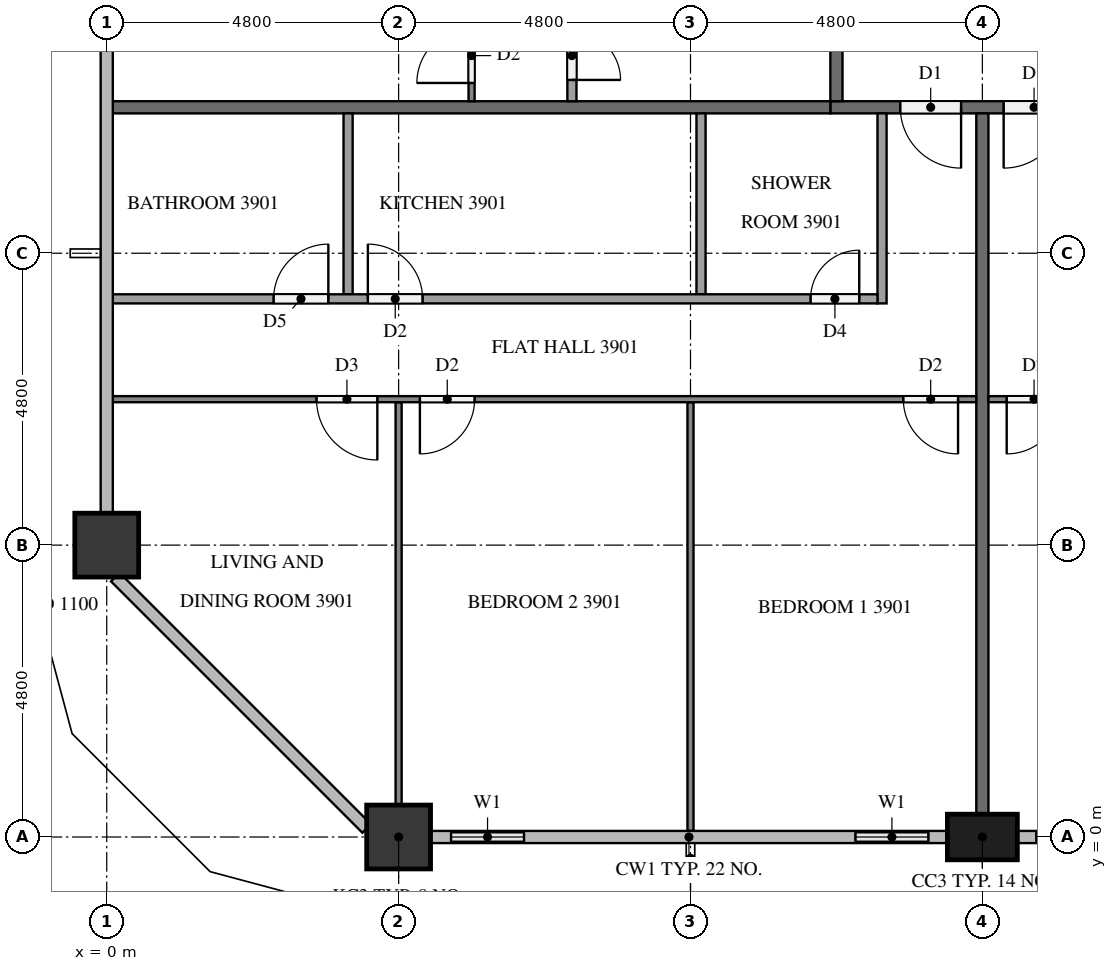
"""IFC4 building model, lengths in metres.
Left out: names, types, materials, properties, quantities, classifications, styles, units other than length and angle.
Written with IfcOpenShell. Run it as: python <this file> out.ifc"""

import sys

from ifc_helpers import new_model, si_unit, direction, frame, frame_2d, origin, origin_2d, place, context, subcontext, project, spatial, rectangle, extrude, element, fill, save


model = new_model("IFC4")
c1 = context("Model", 3, precision=1e-05, world=origin(), true_north=direction((0.0, 1.0)))
c2 = subcontext(c1, "Body", "Model", "MODEL_VIEW")
j1 = project(units=[si_unit("LENGTHUNIT", "METRE"), si_unit("PLANEANGLEUNIT", "RADIAN")], contexts=[c1])
p1 = place(None, origin())
s1 = spatial("IfcSite", under=j1, at=p1, CompositionType="ELEMENT")
p2 = place(p1, origin())
s2 = spatial("IfcBuilding", under=s1, at=p2, CompositionType="ELEMENT")
p3 = place(p2, frame((0.0, 0.0, 152.5)))
s3 = spatial("IfcBuildingStorey", under=s2, at=p3, CompositionType="ELEMENT", Elevation=152.5)
p4 = place(p3, frame((4.8, 0.0, 0.0), z_axis=(0.0, 0.0, 1.0), x_axis=(1.0, 0.0, 0.0)))
e1 = element("IfcColumn", 1, at=p4, inside=s3, PredefinedType="COLUMN", context=c2, shape_type="SweptSolid", body=[
    extrude(rectangle(XDim=1.05, YDim=1.05, at=origin_2d()), origin(), (0.0, 0.0, 1.0), 3.2),
])
p5 = place(p3, frame((14.4, 0.0, 0.0), z_axis=(0.0, 0.0, 1.0), x_axis=(1.0, 0.0, 0.0)))
e2 = element("IfcColumn", 2, at=p5, inside=s3, PredefinedType="COLUMN", context=c2, shape_type="SweptSolid", body=[
    extrude(rectangle(XDim=1.15, YDim=0.75, at=origin_2d()), origin(), (0.0, 0.0, 1.0), 3.2),
])
p6 = place(p3, frame((0.0, 4.8, 0.0), z_axis=(0.0, 0.0, 1.0), x_axis=(1.0, 0.0, 0.0)))
e3 = element("IfcColumn", 3, at=p6, inside=s3, PredefinedType="COLUMN", context=c2, shape_type="SweptSolid", body=[
    extrude(rectangle(XDim=1.05, YDim=1.05, at=origin_2d()), origin(), (0.0, 0.0, 1.0), 3.2),
])
p7 = place(p3, frame((5.325, 0.0, 0.0), z_axis=(0.0, 0.0, 1.0), x_axis=(1.0, 0.0, 0.0)))
e4 = element("IfcWall", 4, at=p7, inside=s3, PredefinedType="SOLIDWALL", context=c2, shape_type="SweptSolid", body=[
    extrude(rectangle(XDim=1.875, YDim=0.15, at=frame_2d((0.938, 0.0))), origin(), (0.0, 0.0, 1.0), 3.2),
])
p8 = place(p7, frame((0.337, 0.0, 0.9)))
e5 = element("IfcOpeningElement", 5, at=p8, cuts=e4, PredefinedType="OPENING", context=c2, shape_type="SweptSolid", body=[
    extrude(rectangle(XDim=1.2, YDim=1.4, at=frame_2d((0.6, 0.7))), frame((0.0, 0.085, 0.0), z_axis=(0.0, -1.0, 0.0), x_axis=(1.0, 0.0, 0.0)), (0.0, 0.0, 1.0), 0.17),
])
p9 = place(p3, frame((12.0, 0.0, 0.0), z_axis=(0.0, 0.0, 1.0), x_axis=(1.0, 0.0, 0.0)))
e6 = element("IfcWall", 6, at=p9, inside=s3, PredefinedType="SOLIDWALL", context=c2, shape_type="SweptSolid", body=[
    extrude(rectangle(XDim=1.825, YDim=0.15, at=frame_2d((0.913, 0.0))), origin(), (0.0, 0.0, 1.0), 3.2),
])
p10 = place(p9, frame((0.312, 0.0, 0.9)))
e7 = element("IfcOpeningElement", 7, at=p10, cuts=e6, PredefinedType="OPENING", context=c2, shape_type="SweptSolid", body=[
    extrude(rectangle(XDim=1.2, YDim=1.4, at=frame_2d((0.6, 0.7))), frame((0.0, 0.085, 0.0), z_axis=(0.0, -1.0, 0.0), x_axis=(1.0, 0.0, 0.0)), (0.0, 0.0, 1.0), 0.17),
])
p11 = place(p3, frame((14.975, 0.0, 0.0), z_axis=(0.0, 0.0, 1.0), x_axis=(1.0, 0.0, 0.0)))
e8 = element("IfcWall", 8, at=p11, inside=s3, PredefinedType="SOLIDWALL", context=c2, shape_type="SweptSolid", body=[
    extrude(rectangle(XDim=1.825, YDim=0.15, at=frame_2d((0.913, 0.0))), origin(), (0.0, 0.0, 1.0), 3.2),
])
p12 = place(p11, frame((0.312, 0.0, 0.9)))
e9 = element("IfcOpeningElement", 9, at=p12, cuts=e8, PredefinedType="OPENING", context=c2, shape_type="SweptSolid", body=[
    extrude(rectangle(XDim=1.2, YDim=1.4, at=frame_2d((0.6, 0.7))), frame((0.0, 0.085, 0.0), z_axis=(0.0, -1.0, 0.0), x_axis=(1.0, 0.0, 0.0)), (0.0, 0.0, 1.0), 0.17),
])
p13 = place(p3, frame((50.5, 12.0, 0.0), z_axis=(0.0, 0.0, 1.0), x_axis=(-1.0, 0.0, 0.0)))
e10 = element("IfcWall", 10, at=p13, inside=s3, PredefinedType="PARTITIONING", context=c2, shape_type="SweptSolid", body=[
    extrude(rectangle(XDim=38.6, YDim=0.2, at=frame_2d((19.3, 0.0))), origin(), (0.0, 0.0, 1.0), 3.2),
])
p14 = place(p13, frame((36.45, 0.0, 0.0)))
e11 = element("IfcOpeningElement", 11, at=p14, cuts=e10, PredefinedType="OPENING", context=c2, shape_type="SweptSolid", body=[
    extrude(rectangle(XDim=1.0, YDim=2.1, at=frame_2d((0.5, 1.05))), frame((0.0, 0.11, 0.0), z_axis=(0.0, -1.0, 0.0), x_axis=(1.0, 0.0, 0.0)), (0.0, 0.0, 1.0), 0.22),
])
p15 = place(p13, frame((34.75, 0.0, 0.0)))
e12 = element("IfcOpeningElement", 12, at=p15, cuts=e10, PredefinedType="OPENING", context=c2, shape_type="SweptSolid", body=[
    extrude(rectangle(XDim=1.0, YDim=2.1, at=frame_2d((0.5, 1.05))), frame((0.0, 0.11, 0.0), z_axis=(0.0, -1.0, 0.0), x_axis=(1.0, 0.0, 0.0)), (0.0, 0.0, 1.0), 0.22),
])
p16 = place(p13, frame((10.05, 0.0, 0.0)))
e13 = element("IfcOpeningElement", 13, at=p16, cuts=e10, PredefinedType="OPENING", context=c2, shape_type="SweptSolid", body=[
    extrude(rectangle(XDim=1.0, YDim=2.1, at=frame_2d((0.5, 1.05))), frame((0.0, 0.11, 0.0), z_axis=(0.0, -1.0, 0.0), x_axis=(1.0, 0.0, 0.0)), (0.0, 0.0, 1.0), 0.22),
])
p17 = place(p13, frame((8.35, 0.0, 0.0)))
e14 = element("IfcOpeningElement", 14, at=p17, cuts=e10, PredefinedType="OPENING", context=c2, shape_type="SweptSolid", body=[
    extrude(rectangle(XDim=1.0, YDim=2.1, at=frame_2d((0.5, 1.05))), frame((0.0, 0.11, 0.0), z_axis=(0.0, -1.0, 0.0), x_axis=(1.0, 0.0, 0.0)), (0.0, 0.0, 1.0), 0.22),
])
p18 = place(p3, frame((12.0, 12.1, 0.0), z_axis=(0.0, 0.0, 1.0), x_axis=(0.0, 1.0, 0.0)))
e15 = element("IfcWall", 15, at=p18, inside=s3, PredefinedType="PARTITIONING", context=c2, shape_type="SweptSolid", body=[
    extrude(rectangle(XDim=28.6, YDim=0.2, at=frame_2d((14.3, 0.0))), origin(), (0.0, 0.0, 1.0), 3.2),
])
p19 = place(p18, frame((27.35, 0.0, 0.0)))
e16 = element("IfcOpeningElement", 16, at=p19, cuts=e15, PredefinedType="OPENING", context=c2, shape_type="SweptSolid", body=[
    extrude(rectangle(XDim=1.0, YDim=2.1, at=frame_2d((0.5, 1.05))), frame((0.0, 0.11, 0.0), z_axis=(0.0, -1.0, 0.0), x_axis=(1.0, 0.0, 0.0)), (0.0, 0.0, 1.0), 0.22),
])
p20 = place(p18, frame((20.15, 0.0, 0.0)))
e17 = element("IfcOpeningElement", 17, at=p20, cuts=e15, PredefinedType="OPENING", context=c2, shape_type="SweptSolid", body=[
    extrude(rectangle(XDim=1.0, YDim=2.1, at=frame_2d((0.5, 1.05))), frame((0.0, 0.11, 0.0), z_axis=(0.0, -1.0, 0.0), x_axis=(1.0, 0.0, 0.0)), (0.0, 0.0, 1.0), 0.22),
])
p21 = place(p18, frame((10.55, 0.0, 0.0)))
e18 = element("IfcOpeningElement", 18, at=p21, cuts=e15, PredefinedType="OPENING", context=c2, shape_type="SweptSolid", body=[
    extrude(rectangle(XDim=1.0, YDim=2.1, at=frame_2d((0.5, 1.05))), frame((0.0, 0.11, 0.0), z_axis=(0.0, -1.0, 0.0), x_axis=(1.0, 0.0, 0.0)), (0.0, 0.0, 1.0), 0.22),
])
p22 = place(p3, frame((14.4, 11.9, 0.0), z_axis=(0.0, 0.0, 1.0), x_axis=(0.0, -1.0, 0.0)))
e19 = element("IfcWall", 19, at=p22, inside=s3, PredefinedType="PARTITIONING", context=c2, shape_type="SweptSolid", body=[
    extrude(rectangle(XDim=11.525, YDim=0.2, at=frame_2d((5.762, 0.0))), origin(), (0.0, 0.0, 1.0), 3.2),
])
p23 = place(p3, frame((0.1, 12.0, 0.0), z_axis=(0.0, 0.0, 1.0), x_axis=(1.0, 0.0, 0.0)))
e20 = element("IfcWall", 20, at=p23, inside=s3, PredefinedType="PARTITIONING", context=c2, shape_type="SweptSolid", body=[
    extrude(rectangle(XDim=11.8, YDim=0.2, at=frame_2d((5.9, 0.0))), origin(), (0.0, 0.0, 1.0), 3.2),
])
p24 = place(p3, frame((9.6, 7.15, 0.0), z_axis=(0.0, 0.0, 1.0), x_axis=(0.0, -1.0, 0.0)))
e21 = element("IfcWall", 21, at=p24, inside=s3, PredefinedType="PARTITIONING", context=c2, shape_type="SweptSolid", body=[
    extrude(rectangle(XDim=7.05, YDim=0.1, at=frame_2d((3.525, 0.0))), origin(), (0.0, 0.0, 1.0), 3.2),
])
p25 = place(p3, frame((4.8, 7.15, 0.0), z_axis=(0.0, 0.0, 1.0), x_axis=(0.0, -1.0, 0.0)))
e22 = element("IfcWall", 22, at=p25, inside=s3, PredefinedType="PARTITIONING", context=c2, shape_type="SweptSolid", body=[
    extrude(rectangle(XDim=6.625, YDim=0.1, at=frame_2d((3.312, 0.0))), origin(), (0.0, 0.0, 1.0), 3.2),
])
p26 = place(p3, frame((14.3, 7.2, 0.0), z_axis=(0.0, 0.0, 1.0), x_axis=(-1.0, 0.0, 0.0)))
e23 = element("IfcWall", 23, at=p26, inside=s3, PredefinedType="PARTITIONING", context=c2, shape_type="SweptSolid", body=[
    extrude(rectangle(XDim=14.2, YDim=0.1, at=frame_2d((7.1, 0.0))), origin(), (0.0, 0.0, 1.0), 3.2),
])
p27 = place(p26, frame((0.3, 0.0, 0.0)))
e24 = element("IfcOpeningElement", 24, at=p27, cuts=e23, PredefinedType="OPENING", context=c2, shape_type="SweptSolid", body=[
    extrude(rectangle(XDim=0.9, YDim=2.1, at=frame_2d((0.45, 1.05))), frame((0.0, 0.06, 0.0), z_axis=(0.0, -1.0, 0.0), x_axis=(1.0, 0.0, 0.0)), (0.0, 0.0, 1.0), 0.12),
])
p28 = place(p26, frame((8.25, 0.0, 0.0)))
e25 = element("IfcOpeningElement", 25, at=p28, cuts=e23, PredefinedType="OPENING", context=c2, shape_type="SweptSolid", body=[
    extrude(rectangle(XDim=0.9, YDim=2.1, at=frame_2d((0.45, 1.05))), frame((0.0, 0.06, 0.0), z_axis=(0.0, -1.0, 0.0), x_axis=(1.0, 0.0, 0.0)), (0.0, 0.0, 1.0), 0.12),
])
p29 = place(p26, frame((9.85, 0.0, 0.0)))
e26 = element("IfcOpeningElement", 26, at=p29, cuts=e23, PredefinedType="OPENING", context=c2, shape_type="SweptSolid", body=[
    extrude(rectangle(XDim=1.0, YDim=2.1, at=frame_2d((0.5, 1.05))), frame((0.0, 0.06, 0.0), z_axis=(0.0, -1.0, 0.0), x_axis=(1.0, 0.0, 0.0)), (0.0, 0.0, 1.0), 0.12),
])
for number, where, z_axis, x_axis in (
    (27, (9.773, 11.9, 0.0), (0.0, 0.0, 1.0), (0.0, -1.0, 0.0)),
    (28, (3.969, 11.9, 0.0), (0.0, 0.0, 1.0), (0.0, -1.0, 0.0)),
):
    element("IfcWall", number, at=place(p3, frame(where, z_axis=z_axis, x_axis=x_axis)), inside=s3, PredefinedType="PARTITIONING", context=c2, shape_type="SweptSolid", body=[
        extrude(rectangle(XDim=2.975, YDim=0.15, at=frame_2d((1.487, 0.0))), origin(), (0.0, 0.0, 1.0), 3.2),
    ])
p30 = place(p3, frame((12.75, 11.9, 0.0), z_axis=(0.0, 0.0, 1.0), x_axis=(0.0, -1.0, 0.0)))
e29 = element("IfcWall", 29, at=p30, inside=s3, PredefinedType="PARTITIONING", context=c2, shape_type="SweptSolid", body=[
    extrude(rectangle(XDim=3.125, YDim=0.15, at=frame_2d((1.562, 0.0))), origin(), (0.0, 0.0, 1.0), 3.2),
])
p31 = place(p3, frame((0.1, 8.85, 0.0), z_axis=(0.0, 0.0, 1.0), x_axis=(1.0, 0.0, 0.0)))
e30 = element("IfcWall", 30, at=p31, inside=s3, PredefinedType="PARTITIONING", context=c2, shape_type="SweptSolid", body=[
    extrude(rectangle(XDim=12.575, YDim=0.15, at=frame_2d((6.288, 0.0))), origin(), (0.0, 0.0, 1.0), 3.2),
])
p32 = place(p31, frame((11.475, 0.0, 0.0)))
e31 = element("IfcOpeningElement", 31, at=p32, cuts=e30, PredefinedType="OPENING", context=c2, shape_type="SweptSolid", body=[
    extrude(rectangle(XDim=0.8, YDim=2.1, at=frame_2d((0.4, 1.05))), frame((0.0, 0.085, 0.0), z_axis=(0.0, -1.0, 0.0), x_axis=(1.0, 0.0, 0.0)), (0.0, 0.0, 1.0), 0.17),
])
p33 = place(p31, frame((4.194, 0.0, 0.0)))
e32 = element("IfcOpeningElement", 32, at=p33, cuts=e30, PredefinedType="OPENING", context=c2, shape_type="SweptSolid", body=[
    extrude(rectangle(XDim=0.9, YDim=2.1, at=frame_2d((0.45, 1.05))), frame((0.0, 0.085, 0.0), z_axis=(0.0, -1.0, 0.0), x_axis=(1.0, 0.0, 0.0)), (0.0, 0.0, 1.0), 0.17),
])
p34 = place(p31, frame((2.644, 0.0, 0.0)))
e33 = element("IfcOpeningElement", 33, at=p34, cuts=e30, PredefinedType="OPENING", context=c2, shape_type="SweptSolid", body=[
    extrude(rectangle(XDim=0.9, YDim=2.1, at=frame_2d((0.45, 1.05))), frame((0.0, 0.085, 0.0), z_axis=(0.0, -1.0, 0.0), x_axis=(1.0, 0.0, 0.0)), (0.0, 0.0, 1.0), 0.17),
])
p35 = place(p3, frame((26.3, 7.2, 0.0), z_axis=(0.0, 0.0, 1.0), x_axis=(-1.0, 0.0, 0.0)))
e34 = element("IfcWall", 34, at=p35, inside=s3, PredefinedType="PARTITIONING", context=c2, shape_type="SweptSolid", body=[
    extrude(rectangle(XDim=11.8, YDim=0.1, at=frame_2d((5.9, 0.0))), origin(), (0.0, 0.0, 1.0), 3.2),
])
p36 = place(p35, frame((10.6, 0.0, 0.0)))
e35 = element("IfcOpeningElement", 35, at=p36, cuts=e34, PredefinedType="OPENING", context=c2, shape_type="SweptSolid", body=[
    extrude(rectangle(XDim=0.9, YDim=2.1, at=frame_2d((0.45, 1.05))), frame((0.0, 0.06, 0.0), z_axis=(0.0, -1.0, 0.0), x_axis=(1.0, 0.0, 0.0)), (0.0, 0.0, 1.0), 0.12),
])
p37 = place(p35, frame((0.3, 0.0, 0.0)))
e36 = element("IfcOpeningElement", 36, at=p37, cuts=e34, PredefinedType="OPENING", context=c2, shape_type="SweptSolid", body=[
    extrude(rectangle(XDim=1.0, YDim=2.1, at=frame_2d((0.5, 1.05))), frame((0.0, 0.06, 0.0), z_axis=(0.0, -1.0, 0.0), x_axis=(1.0, 0.0, 0.0)), (0.0, 0.0, 1.0), 0.12),
])
p38 = place(p3, frame((6.0, 12.1, 0.0), z_axis=(0.0, 0.0, 1.0), x_axis=(0.0, 1.0, 0.0)))
e37 = element("IfcWall", 37, at=p38, inside=s3, PredefinedType="PARTITIONING", context=c2, shape_type="SweptSolid", body=[
    extrude(rectangle(XDim=11.8, YDim=0.1, at=frame_2d((5.9, 0.0))), origin(), (0.0, 0.0, 1.0), 3.2),
])
p39 = place(p38, frame((10.5, 0.0, 0.0)))
e38 = element("IfcOpeningElement", 38, at=p39, cuts=e37, PredefinedType="OPENING", context=c2, shape_type="SweptSolid", body=[
    extrude(rectangle(XDim=1.0, YDim=2.1, at=frame_2d((0.5, 1.05))), frame((0.0, 0.06, 0.0), z_axis=(0.0, -1.0, 0.0), x_axis=(1.0, 0.0, 0.0)), (0.0, 0.0, 1.0), 0.12),
])
p40 = place(p38, frame((0.3, 0.0, 0.0)))
e39 = element("IfcOpeningElement", 39, at=p40, cuts=e37, PredefinedType="OPENING", context=c2, shape_type="SweptSolid", body=[
    extrude(rectangle(XDim=0.9, YDim=2.1, at=frame_2d((0.45, 1.05))), frame((0.0, 0.06, 0.0), z_axis=(0.0, -1.0, 0.0), x_axis=(1.0, 0.0, 0.0)), (0.0, 0.0, 1.0), 0.12),
])
p41 = place(p3, frame((7.65, 22.275, 0.0), z_axis=(0.0, 0.0, 1.0), x_axis=(0.0, -1.0, 0.0)))
e40 = element("IfcWall", 40, at=p41, inside=s3, PredefinedType="PARTITIONING", context=c2, shape_type="SweptSolid", body=[
    extrude(rectangle(XDim=10.175, YDim=0.15, at=frame_2d((5.087, 0.0))), origin(), (0.0, 0.0, 1.0), 3.2),
])
p42 = place(p41, frame((0.3, 0.0, 0.0)))
e41 = element("IfcOpeningElement", 41, at=p42, cuts=e40, PredefinedType="OPENING", context=c2, shape_type="SweptSolid", body=[
    extrude(rectangle(XDim=0.9, YDim=2.1, at=frame_2d((0.45, 1.05))), frame((0.0, 0.085, 0.0), z_axis=(0.0, -1.0, 0.0), x_axis=(1.0, 0.0, 0.0)), (0.0, 0.0, 1.0), 0.17),
])
p43 = place(p41, frame((9.025, 0.0, 0.0)))
e42 = element("IfcOpeningElement", 42, at=p43, cuts=e40, PredefinedType="OPENING", context=c2, shape_type="SweptSolid", body=[
    extrude(rectangle(XDim=0.8, YDim=2.1, at=frame_2d((0.4, 1.05))), frame((0.0, 0.085, 0.0), z_axis=(0.0, -1.0, 0.0), x_axis=(1.0, 0.0, 0.0)), (0.0, 0.0, 1.0), 0.17),
])
p44 = place(p8, origin())
e43 = element("IfcWindow", 43, at=p44, inside=s3, PartitioningType="SINGLE_PANEL", PredefinedType="WINDOW", context=c2, shape_type="SweptSolid", body=[
    extrude(rectangle(XDim=1.2, YDim=1.4, at=frame_2d((0.6, 0.7))), frame((0.0, 0.03, 0.0), z_axis=(0.0, -1.0, 0.0), x_axis=(1.0, 0.0, 0.0)), (0.0, 0.0, 1.0), 0.06),
])
fill(e5, e43)
p45 = place(p10, origin())
e44 = element("IfcWindow", 44, at=p45, inside=s3, PartitioningType="SINGLE_PANEL", PredefinedType="WINDOW", context=c2, shape_type="SweptSolid", body=[
    extrude(rectangle(XDim=1.2, YDim=1.4, at=frame_2d((0.6, 0.7))), frame((0.0, 0.03, 0.0), z_axis=(0.0, -1.0, 0.0), x_axis=(1.0, 0.0, 0.0)), (0.0, 0.0, 1.0), 0.06),
])
fill(e7, e44)
p46 = place(p12, origin())
e45 = element("IfcWindow", 45, at=p46, inside=s3, PartitioningType="SINGLE_PANEL", PredefinedType="WINDOW", context=c2, shape_type="SweptSolid", body=[
    extrude(rectangle(XDim=1.2, YDim=1.4, at=frame_2d((0.6, 0.7))), frame((0.0, 0.03, 0.0), z_axis=(0.0, -1.0, 0.0), x_axis=(1.0, 0.0, 0.0)), (0.0, 0.0, 1.0), 0.06),
])
fill(e9, e45)
p47 = place(p14, origin())
e46 = element("IfcDoor", 46, at=p47, inside=s3, OperationType="SINGLE_SWING_LEFT", PredefinedType="DOOR", context=c2, shape_type="SweptSolid", body=[
    extrude(rectangle(XDim=1.0, YDim=2.1, at=frame_2d((0.5, 1.05))), frame((0.0, 0.025, 0.0), z_axis=(0.0, -1.0, 0.0), x_axis=(1.0, 0.0, 0.0)), (0.0, 0.0, 1.0), 0.05),
])
fill(e11, e46)
p48 = place(p15, origin())
e47 = element("IfcDoor", 47, at=p48, inside=s3, OperationType="SINGLE_SWING_RIGHT", PredefinedType="DOOR", context=c2, shape_type="SweptSolid", body=[
    extrude(rectangle(XDim=1.0, YDim=2.1, at=frame_2d((0.5, 1.05))), frame((0.0, 0.025, 0.0), z_axis=(0.0, -1.0, 0.0), x_axis=(1.0, 0.0, 0.0)), (0.0, 0.0, 1.0), 0.05),
])
fill(e12, e47)
p49 = place(p27, origin())
e48 = element("IfcDoor", 48, at=p49, inside=s3, OperationType="SINGLE_SWING_LEFT", PredefinedType="DOOR", context=c2, shape_type="SweptSolid", body=[
    extrude(rectangle(XDim=0.9, YDim=2.1, at=frame_2d((0.45, 1.05))), frame((0.0, 0.025, 0.0), z_axis=(0.0, -1.0, 0.0), x_axis=(1.0, 0.0, 0.0)), (0.0, 0.0, 1.0), 0.05),
])
fill(e24, e48)
p50 = place(p28, origin())
e49 = element("IfcDoor", 49, at=p50, inside=s3, OperationType="SINGLE_SWING_RIGHT", PredefinedType="DOOR", context=c2, shape_type="SweptSolid", body=[
    extrude(rectangle(XDim=0.9, YDim=2.1, at=frame_2d((0.45, 1.05))), frame((0.0, 0.025, 0.0), z_axis=(0.0, -1.0, 0.0), x_axis=(1.0, 0.0, 0.0)), (0.0, 0.0, 1.0), 0.05),
])
fill(e25, e49)
p51 = place(p29, origin())
e50 = element("IfcDoor", 50, at=p51, inside=s3, OperationType="SINGLE_SWING_LEFT", PredefinedType="DOOR", context=c2, shape_type="SweptSolid", body=[
    extrude(rectangle(XDim=1.0, YDim=2.1, at=frame_2d((0.5, 1.05))), frame((0.0, 0.025, 0.0), z_axis=(0.0, -1.0, 0.0), x_axis=(1.0, 0.0, 0.0)), (0.0, 0.0, 1.0), 0.05),
])
fill(e26, e50)
p52 = place(p32, origin())
e51 = element("IfcDoor", 51, at=p52, inside=s3, OperationType="SINGLE_SWING_RIGHT", PredefinedType="DOOR", context=c2, shape_type="SweptSolid", body=[
    extrude(rectangle(XDim=0.8, YDim=2.1, at=frame_2d((0.4, 1.05))), frame((0.0, 0.025, 0.0), z_axis=(0.0, -1.0, 0.0), x_axis=(1.0, 0.0, 0.0)), (0.0, 0.0, 1.0), 0.05),
])
fill(e31, e51)
p53 = place(p33, origin())
e52 = element("IfcDoor", 52, at=p53, inside=s3, OperationType="SINGLE_SWING_LEFT", PredefinedType="DOOR", context=c2, shape_type="SweptSolid", body=[
    extrude(rectangle(XDim=0.9, YDim=2.1, at=frame_2d((0.45, 1.05))), frame((0.0, 0.025, 0.0), z_axis=(0.0, -1.0, 0.0), x_axis=(1.0, 0.0, 0.0)), (0.0, 0.0, 1.0), 0.05),
])
fill(e32, e52)
p54 = place(p34, origin())
e53 = element("IfcDoor", 53, at=p54, inside=s3, OperationType="SINGLE_SWING_RIGHT", PredefinedType="DOOR", context=c2, shape_type="SweptSolid", body=[
    extrude(rectangle(XDim=0.9, YDim=2.1, at=frame_2d((0.45, 1.05))), frame((0.0, 0.025, 0.0), z_axis=(0.0, -1.0, 0.0), x_axis=(1.0, 0.0, 0.0)), (0.0, 0.0, 1.0), 0.05),
])
fill(e33, e53)
p55 = place(p36, origin())
e54 = element("IfcDoor", 54, at=p55, inside=s3, OperationType="SINGLE_SWING_RIGHT", PredefinedType="DOOR", context=c2, shape_type="SweptSolid", body=[
    extrude(rectangle(XDim=0.9, YDim=2.1, at=frame_2d((0.45, 1.05))), frame((0.0, 0.025, 0.0), z_axis=(0.0, -1.0, 0.0), x_axis=(1.0, 0.0, 0.0)), (0.0, 0.0, 1.0), 0.05),
])
fill(e35, e54)
p56 = place(p40, origin())
e55 = element("IfcDoor", 55, at=p56, inside=s3, OperationType="SINGLE_SWING_LEFT", PredefinedType="DOOR", context=c2, shape_type="SweptSolid", body=[
    extrude(rectangle(XDim=0.9, YDim=2.1, at=frame_2d((0.45, 1.05))), frame((0.0, 0.025, 0.0), z_axis=(0.0, -1.0, 0.0), x_axis=(1.0, 0.0, 0.0)), (0.0, 0.0, 1.0), 0.05),
])
fill(e39, e55)
p57 = place(p43, origin())
e56 = element("IfcDoor", 56, at=p57, inside=s3, OperationType="SINGLE_SWING_RIGHT", PredefinedType="DOOR", context=c2, shape_type="SweptSolid", body=[
    extrude(rectangle(XDim=0.8, YDim=2.1, at=frame_2d((0.4, 1.05))), frame((0.0, 0.025, 0.0), z_axis=(0.0, -1.0, 0.0), x_axis=(1.0, 0.0, 0.0)), (0.0, 0.0, 1.0), 0.05),
])
fill(e42, e56)
save(model, sys.argv[1])
